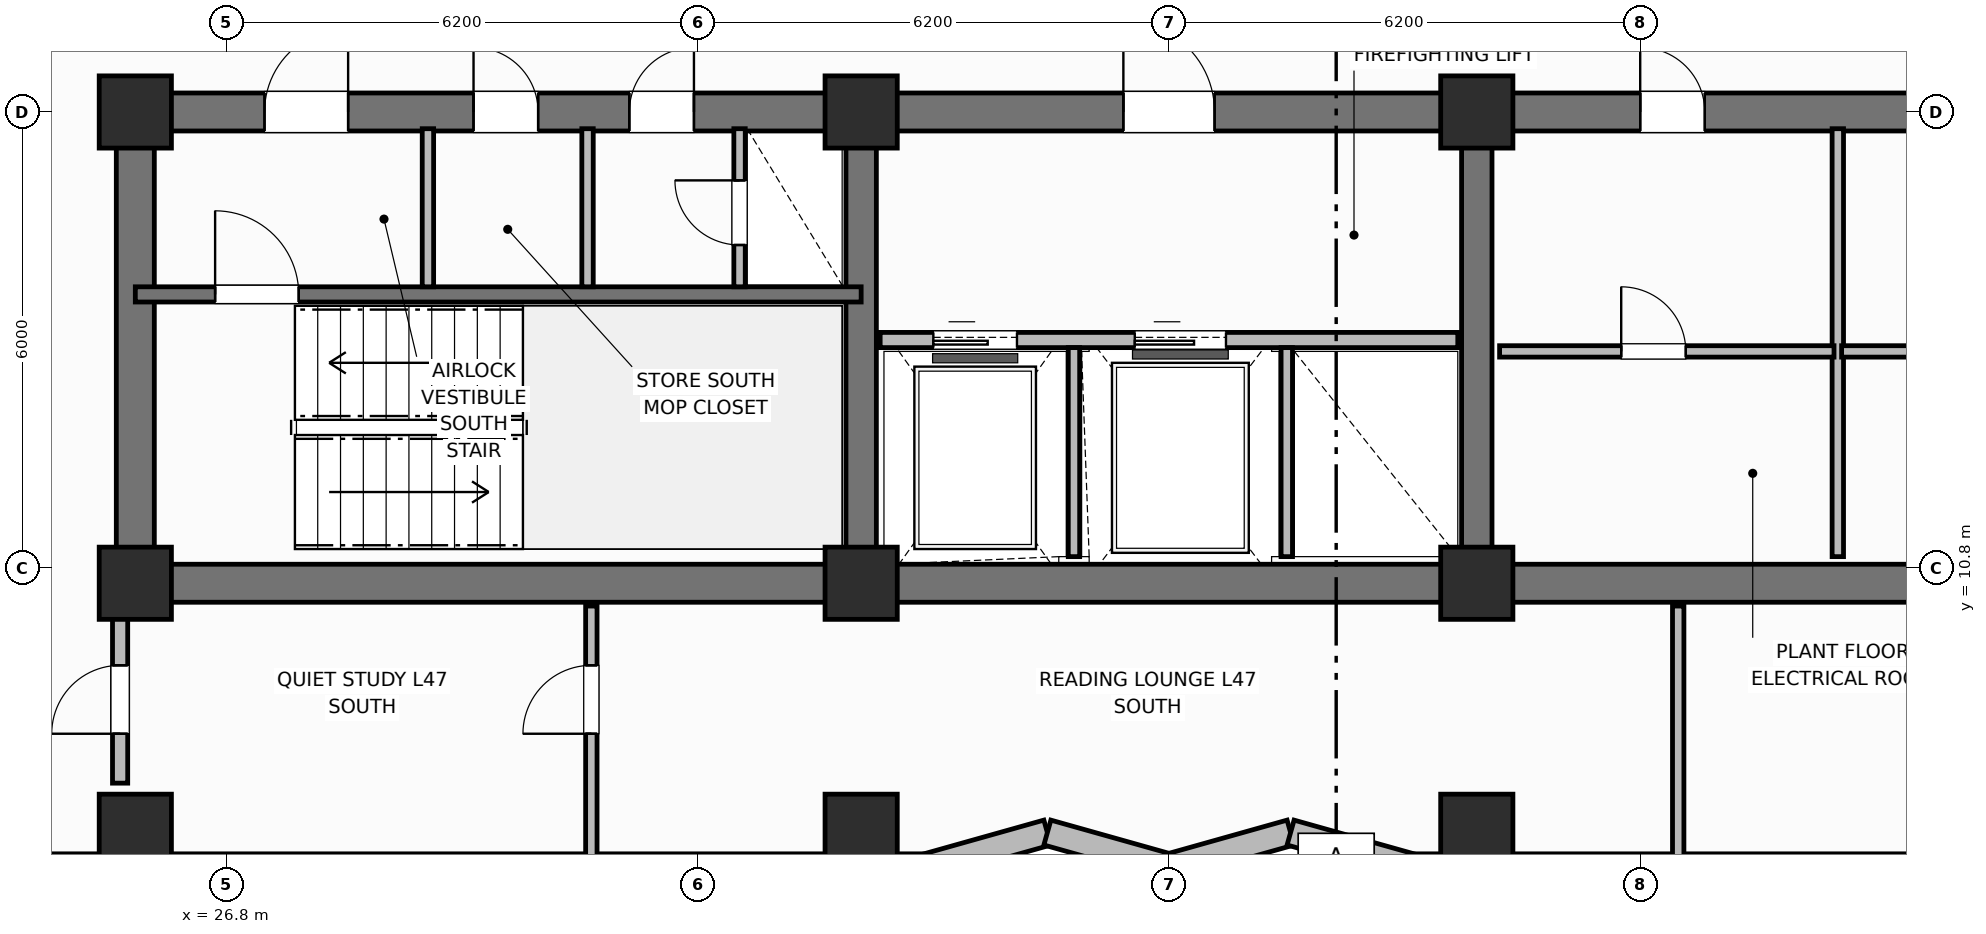
"""IFC4 building model, lengths in metres.
Left out: names, types, materials, properties, quantities, classifications, styles, units other than length and angle.
Written with IfcOpenShell. Run it as: python <this file> out.ifc"""

import sys

from ifc_helpers import new_model, si_unit, direction, frame, frame_2d, origin, origin_2d, place, context, subcontext, project, spatial, rectangle, extrude, element, fill, save


model = new_model("IFC4")
c1 = context("Model", 3, precision=1e-05, world=origin(), true_north=direction((0.0, 1.0)))
c2 = subcontext(c1, "Body", "Model", "MODEL_VIEW")
j1 = project(units=[si_unit("LENGTHUNIT", "METRE"), si_unit("PLANEANGLEUNIT", "RADIAN")], contexts=[c1])
p1 = place(None, origin())
s1 = spatial("IfcSite", under=j1, at=p1, CompositionType="ELEMENT")
p2 = place(p1, origin())
s2 = spatial("IfcBuilding", under=s1, at=p2, CompositionType="ELEMENT")
p3 = place(p2, frame((0.0, 0.0, 188.5)))
s3 = spatial("IfcBuildingStorey", under=s2, at=p3, CompositionType="ELEMENT", Elevation=188.5)
p4 = place(p3, frame((52.8, 10.6, 0.0), z_axis=(0.0, 0.0, 1.0), x_axis=(-1.0, 0.0, 0.0)))
e1 = element("IfcWall", 1, at=p4, inside=s3, PredefinedType="SHEAR", context=c2, shape_type="SweptSolid", body=[
    extrude(rectangle(XDim=27.2, YDim=0.5, at=frame_2d((13.6, 0.0))), origin(), (0.0, 0.0, 1.0), 3.7),
])
p5 = place(p3, frame((25.6, 10.85, 0.0), z_axis=(0.0, 0.0, 1.0), x_axis=(0.0, 1.0, 0.0)))
e2 = element("IfcWall", 2, at=p5, inside=s3, PredefinedType="SHEAR", context=c2, shape_type="SweptSolid", body=[
    extrude(rectangle(XDim=5.7, YDim=0.5, at=frame_2d((2.85, 0.0))), origin(), (0.0, 0.0, 1.0), 3.7),
])
p6 = place(p3, frame((25.6, 16.8, 0.0), z_axis=(0.0, 0.0, 1.0), x_axis=(1.0, 0.0, 0.0)))
e3 = element("IfcWall", 3, at=p6, inside=s3, PredefinedType="SHEAR", context=c2, shape_type="SweptSolid", body=[
    extrude(rectangle(XDim=27.2, YDim=0.5, at=frame_2d((13.6, 0.0))), origin(), (0.0, 0.0, 1.0), 3.7),
])
p7 = place(p6, frame((1.7, 0.0, 0.0)))
e4 = element("IfcOpeningElement", 4, at=p7, cuts=e3, PredefinedType="OPENING", context=c2, shape_type="SweptSolid", body=[
    extrude(rectangle(XDim=1.1, YDim=2.15, at=frame_2d((0.55, 1.075))), frame((0.0, 0.26, 0.0), z_axis=(0.0, -1.0, 0.0), x_axis=(1.0, 0.0, 0.0)), (0.0, 0.0, 1.0), 0.52),
])
p8 = place(p6, frame((4.45, 0.0, 0.0)))
e5 = element("IfcOpeningElement", 5, at=p8, cuts=e3, PredefinedType="OPENING", context=c2, shape_type="SweptSolid", body=[
    extrude(rectangle(XDim=0.85, YDim=2.1, at=frame_2d((0.425, 1.05))), frame((0.0, 0.26, 0.0), z_axis=(0.0, -1.0, 0.0), x_axis=(1.0, 0.0, 0.0)), (0.0, 0.0, 1.0), 0.52),
])
p9 = place(p6, frame((6.5, 0.0, 0.0)))
e6 = element("IfcOpeningElement", 6, at=p9, cuts=e3, PredefinedType="OPENING", context=c2, shape_type="SweptSolid", body=[
    extrude(rectangle(XDim=0.85, YDim=2.1, at=frame_2d((0.425, 1.05))), frame((0.0, 0.26, 0.0), z_axis=(0.0, -1.0, 0.0), x_axis=(1.0, 0.0, 0.0)), (0.0, 0.0, 1.0), 0.52),
])
p10 = place(p6, frame((13.0, 0.0, 0.0)))
e7 = element("IfcOpeningElement", 7, at=p10, cuts=e3, PredefinedType="OPENING", context=c2, shape_type="SweptSolid", body=[
    extrude(rectangle(XDim=1.2, YDim=2.15, at=frame_2d((0.6, 1.075))), frame((0.0, 0.26, 0.0), z_axis=(0.0, -1.0, 0.0), x_axis=(1.0, 0.0, 0.0)), (0.0, 0.0, 1.0), 0.52),
])
p11 = place(p6, frame((19.8, 0.0, 0.0)))
e8 = element("IfcOpeningElement", 8, at=p11, cuts=e3, PredefinedType="OPENING", context=c2, shape_type="SweptSolid", body=[
    extrude(rectangle(XDim=0.85, YDim=2.1, at=frame_2d((0.425, 1.05))), frame((0.0, 0.26, 0.0), z_axis=(0.0, -1.0, 0.0), x_axis=(1.0, 0.0, 0.0)), (0.0, 0.0, 1.0), 0.52),
])
p12 = place(p6, frame((24.2, 0.0, 0.0)))
e9 = element("IfcOpeningElement", 9, at=p12, cuts=e3, PredefinedType="OPENING", context=c2, shape_type="SweptSolid", body=[
    extrude(rectangle(XDim=0.85, YDim=2.1, at=frame_2d((0.425, 1.05))), frame((0.0, 0.26, 0.0), z_axis=(0.0, -1.0, 0.0), x_axis=(1.0, 0.0, 0.0)), (0.0, 0.0, 1.0), 0.52),
])
for number, where, z_axis, x_axis in (
    (10, (35.15, 10.85, 0.0), (0.0, 0.0, 1.0), (0.0, 1.0, 0.0)),
    (11, (43.25, 10.85, 0.0), (0.0, 0.0, 1.0), (0.0, 1.0, 0.0)),
):
    element("IfcWall", number, at=place(p3, frame(where, z_axis=z_axis, x_axis=x_axis)), inside=s3, PredefinedType="SHEAR", context=c2, shape_type="SweptSolid", body=[
        extrude(rectangle(XDim=5.7, YDim=0.4, at=frame_2d((2.85, 0.0))), origin(), (0.0, 0.0, 1.0), 3.7),
    ])
for number, where, z_axis, x_axis in (
    (12, (25.6, 10.6, 0.0), (0.0, 0.0, 1.0), (1.0, 0.0, 0.0)),
    (13, (25.6, 16.8, 0.0), (0.0, 0.0, 1.0), (1.0, 0.0, 0.0)),
    (14, (35.15, 10.6, 0.0), (0.0, 0.0, 1.0), (1.0, 0.0, 0.0)),
    (15, (35.15, 16.8, 0.0), (0.0, 0.0, 1.0), (1.0, 0.0, 0.0)),
    (16, (43.25, 10.6, 0.0), (0.0, 0.0, 1.0), (1.0, 0.0, 0.0)),
    (17, (43.25, 16.8, 0.0), (0.0, 0.0, 1.0), (1.0, 0.0, 0.0)),
    (18, (25.6, 7.35, 0.0), (0.0, 0.0, 1.0), (1.0, 0.0, 0.0)),
    (19, (35.15, 7.35, 0.0), (0.0, 0.0, 1.0), (1.0, 0.0, 0.0)),
    (20, (43.25, 7.35, 0.0), (0.0, 0.0, 1.0), (1.0, 0.0, 0.0)),
):
    element("IfcColumn", number, at=place(p3, frame(where, z_axis=z_axis, x_axis=x_axis)), inside=s3, PredefinedType="COLUMN", context=c2, shape_type="SweptSolid", body=[
        extrude(rectangle(XDim=0.95, YDim=0.95, at=origin_2d()), origin(), (0.0, 0.0, 1.0), 3.7),
    ])
p13 = place(p3, frame((20.2, 6.87, 0.0), z_axis=(0.0, 0.0, 1.0), x_axis=(1.0, 0.0, 0.0)))
e21 = element("IfcWall", 21, at=p13, inside=s3, PredefinedType="SOLIDWALL", context=c2, shape_type="SweptSolid", body=[
    extrude(rectangle(XDim=15.8, YDim=0.34, at=frame_2d((7.9, 0.0))), origin(), (0.0, 0.0, 1.0), 2.72),
])
p14 = place(p13, frame((1.762, 0.0, 0.75)))
e22 = element("IfcOpeningElement", 22, at=p14, cuts=e21, PredefinedType="OPENING", context=c2, shape_type="SweptSolid", body=[
    extrude(rectangle(XDim=1.4, YDim=1.85, at=frame_2d((0.7, 0.925))), frame((0.0, 0.18, 0.0), z_axis=(0.0, -1.0, 0.0), x_axis=(1.0, 0.0, 0.0)), (0.0, 0.0, 1.0), 0.36),
])
p15 = place(p13, frame((9.012, 0.0, 0.75)))
e23 = element("IfcOpeningElement", 23, at=p15, cuts=e21, PredefinedType="OPENING", context=c2, shape_type="SweptSolid", body=[
    extrude(rectangle(XDim=1.4, YDim=1.85, at=frame_2d((0.7, 0.925))), frame((0.0, 0.18, 0.0), z_axis=(0.0, -1.0, 0.0), x_axis=(1.0, 0.0, 0.0)), (0.0, 0.0, 1.0), 0.36),
])
p16 = place(p13, frame((12.288, 0.0, 0.75)))
e24 = element("IfcOpeningElement", 24, at=p16, cuts=e21, PredefinedType="OPENING", context=c2, shape_type="SweptSolid", body=[
    extrude(rectangle(XDim=1.4, YDim=1.85, at=frame_2d((0.7, 0.925))), frame((0.0, 0.18, 0.0), z_axis=(0.0, -1.0, 0.0), x_axis=(1.0, 0.0, 0.0)), (0.0, 0.0, 1.0), 0.36),
])
p17 = place(p3, frame((36.0, 6.87, 0.0), z_axis=(0.0, 0.0, 1.0), x_axis=(0.962662902433, 0.270703040766, 0.0)))
e25 = element("IfcWall", 25, at=p17, inside=s3, PredefinedType="SOLIDWALL", context=c2, shape_type="SweptSolid", body=[
    extrude(rectangle(XDim=1.662, YDim=0.34, at=frame_2d((0.831, 0.0))), origin(), (0.0, 0.0, 1.0), 2.72),
])
p18 = place(p3, frame((37.6, 7.32, 0.0), z_axis=(0.0, 0.0, 1.0), x_axis=(0.962652136636, -0.270741322725, 0.0)))
e26 = element("IfcWall", 26, at=p18, inside=s3, PredefinedType="SOLIDWALL", context=c2, shape_type="SweptSolid", body=[
    extrude(rectangle(XDim=1.662, YDim=0.34, at=frame_2d((0.831, 0.0))), origin(), (0.0, 0.0, 1.0), 2.72),
])
p19 = place(p3, frame((39.2, 6.87, 0.0), z_axis=(0.0, 0.0, 1.0), x_axis=(0.962662902433, 0.270703040766, 0.0)))
e27 = element("IfcWall", 27, at=p19, inside=s3, PredefinedType="SOLIDWALL", context=c2, shape_type="SweptSolid", body=[
    extrude(rectangle(XDim=1.662, YDim=0.34, at=frame_2d((0.831, 0.0))), origin(), (0.0, 0.0, 1.0), 2.72),
])
p20 = place(p3, frame((40.8, 7.32, 0.0), z_axis=(0.0, 0.0, 1.0), x_axis=(0.962652136636, -0.270741322725, 0.0)))
e28 = element("IfcWall", 28, at=p20, inside=s3, PredefinedType="SOLIDWALL", context=c2, shape_type="SweptSolid", body=[
    extrude(rectangle(XDim=1.662, YDim=0.34, at=frame_2d((0.831, 0.0))), origin(), (0.0, 0.0, 1.0), 2.72),
])
p21 = place(p3, frame((42.4, 6.87, 0.0), z_axis=(0.0, 0.0, 1.0), x_axis=(1.0, 0.0, 0.0)))
e29 = element("IfcWall", 29, at=p21, inside=s3, PredefinedType="SOLIDWALL", context=c2, shape_type="SweptSolid", body=[
    extrude(rectangle(XDim=15.8, YDim=0.34, at=frame_2d((7.9, 0.0))), origin(), (0.0, 0.0, 1.0), 2.72),
])
p22 = place(p21, frame((5.387, 0.0, 0.75)))
e30 = element("IfcOpeningElement", 30, at=p22, cuts=e29, PredefinedType="OPENING", context=c2, shape_type="SweptSolid", body=[
    extrude(rectangle(XDim=1.4, YDim=1.85, at=frame_2d((0.7, 0.925))), frame((0.0, 0.18, 0.0), z_axis=(0.0, -1.0, 0.0), x_axis=(1.0, 0.0, 0.0)), (0.0, 0.0, 1.0), 0.36),
])
p23 = place(p3, frame((25.6, 14.4, 0.0), z_axis=(0.0, 0.0, 1.0), x_axis=(1.0, 0.0, 0.0)))
e31 = element("IfcWall", 31, at=p23, inside=s3, PredefinedType="SHEAR", context=c2, shape_type="SweptSolid", body=[
    extrude(rectangle(XDim=9.55, YDim=0.2, at=frame_2d((4.775, 0.0))), origin(), (0.0, 0.0, 1.0), 3.7),
])
p24 = place(p23, frame((1.05, 0.0, 0.0)))
e32 = element("IfcOpeningElement", 32, at=p24, cuts=e31, PredefinedType="OPENING", context=c2, shape_type="SweptSolid", body=[
    extrude(rectangle(XDim=1.1, YDim=2.15, at=frame_2d((0.55, 1.075))), frame((0.0, 0.11, 0.0), z_axis=(0.0, -1.0, 0.0), x_axis=(1.0, 0.0, 0.0)), (0.0, 0.0, 1.0), 0.22),
])
for number, where, z_axis, x_axis in (
    (33, (29.45, 14.5, 0.0), (0.0, 0.0, 1.0), (0.0, 1.0, 0.0)),
    (34, (31.55, 14.5, 0.0), (0.0, 0.0, 1.0), (0.0, 1.0, 0.0)),
):
    element("IfcWall", number, at=place(p3, frame(where, z_axis=z_axis, x_axis=x_axis)), inside=s3, PredefinedType="PARTITIONING", context=c2, shape_type="SweptSolid", body=[
        extrude(rectangle(XDim=2.08, YDim=0.15, at=frame_2d((1.04, 0.0))), origin(), (0.0, 0.0, 1.0), 2.55),
    ])
p25 = place(p3, frame((33.55, 14.5, 0.0), z_axis=(0.0, 0.0, 1.0), x_axis=(0.0, 1.0, 0.0)))
e35 = element("IfcWall", 35, at=p25, inside=s3, PredefinedType="PARTITIONING", context=c2, shape_type="SweptSolid", body=[
    extrude(rectangle(XDim=2.08, YDim=0.15, at=frame_2d((1.04, 0.0))), origin(), (0.0, 0.0, 1.0), 2.55),
])
p26 = place(p25, frame((0.55, 0.0, 0.0)))
e36 = element("IfcOpeningElement", 36, at=p26, cuts=e35, PredefinedType="OPENING", context=c2, shape_type="SweptSolid", body=[
    extrude(rectangle(XDim=0.85, YDim=2.05, at=frame_2d((0.425, 1.025))), frame((0.0, 0.085, 0.0), z_axis=(0.0, -1.0, 0.0), x_axis=(1.0, 0.0, 0.0)), (0.0, 0.0, 1.0), 0.17),
])
p27 = place(p3, frame((35.4, 13.8, 0.0), z_axis=(0.0, 0.0, 1.0), x_axis=(1.0, 0.0, 0.0)))
e37 = element("IfcWall", 37, at=p27, inside=s3, PredefinedType="PARTITIONING", context=c2, shape_type="SweptSolid", body=[
    extrude(rectangle(XDim=7.6, YDim=0.2, at=frame_2d((3.8, 0.0))), origin(), (0.0, 0.0, 1.0), 2.32),
])
p28 = place(p27, frame((0.7, 0.0, 0.0)))
e38 = element("IfcOpeningElement", 38, at=p28, cuts=e37, PredefinedType="OPENING", context=c2, shape_type="SweptSolid", body=[
    extrude(rectangle(XDim=1.1, YDim=2.15, at=frame_2d((0.55, 1.075))), frame((0.0, 0.11, 0.0), z_axis=(0.0, -1.0, 0.0), x_axis=(1.0, 0.0, 0.0)), (0.0, 0.0, 1.0), 0.22),
])
p29 = place(p27, frame((3.35, 0.0, 0.0)))
e39 = element("IfcOpeningElement", 39, at=p29, cuts=e37, PredefinedType="OPENING", context=c2, shape_type="SweptSolid", body=[
    extrude(rectangle(XDim=1.2, YDim=2.15, at=frame_2d((0.6, 1.075))), frame((0.0, 0.11, 0.0), z_axis=(0.0, -1.0, 0.0), x_axis=(1.0, 0.0, 0.0)), (0.0, 0.0, 1.0), 0.22),
])
for number, where, z_axis, x_axis in (
    (40, (37.95, 10.95, 0.0), (0.0, 0.0, 1.0), (0.0, 1.0, 0.0)),
    (41, (40.75, 10.95, 0.0), (0.0, 0.0, 1.0), (0.0, 1.0, 0.0)),
):
    element("IfcWall", number, at=place(p3, frame(where, z_axis=z_axis, x_axis=x_axis)), inside=s3, PredefinedType="PARTITIONING", context=c2, shape_type="SweptSolid", body=[
        extrude(rectangle(XDim=2.75, YDim=0.15, at=frame_2d((1.375, 0.0))), origin(), (0.0, 0.0, 1.0), 2.55),
    ])
p30 = place(p3, frame((48.0, 10.95, 0.0), z_axis=(0.0, 0.0, 1.0), x_axis=(0.0, 1.0, 0.0)))
e42 = element("IfcWall", 42, at=p30, inside=s3, PredefinedType="PARTITIONING", context=c2, shape_type="SweptSolid", body=[
    extrude(rectangle(XDim=5.63, YDim=0.15, at=frame_2d((2.815, 0.0))), origin(), (0.0, 0.0, 1.0), 2.55),
])
p31 = place(p3, frame((43.55, 13.65, 0.0), z_axis=(0.0, 0.0, 1.0), x_axis=(1.0, 0.0, 0.0)))
e43 = element("IfcWall", 43, at=p31, inside=s3, PredefinedType="PARTITIONING", context=c2, shape_type="SweptSolid", body=[
    extrude(rectangle(XDim=4.4, YDim=0.15, at=frame_2d((2.2, 0.0))), origin(), (0.0, 0.0, 1.0), 2.55),
])
p32 = place(p31, frame((1.6, 0.0, 0.0)))
e44 = element("IfcOpeningElement", 44, at=p32, cuts=e43, PredefinedType="OPENING", context=c2, shape_type="SweptSolid", body=[
    extrude(rectangle(XDim=0.85, YDim=2.1, at=frame_2d((0.425, 1.05))), frame((0.0, 0.085, 0.0), z_axis=(0.0, -1.0, 0.0), x_axis=(1.0, 0.0, 0.0)), (0.0, 0.0, 1.0), 0.17),
])
p33 = place(p3, frame((48.05, 13.65, 0.0), z_axis=(0.0, 0.0, 1.0), x_axis=(1.0, 0.0, 0.0)))
e45 = element("IfcWall", 45, at=p33, inside=s3, PredefinedType="PARTITIONING", context=c2, shape_type="SweptSolid", body=[
    extrude(rectangle(XDim=4.4, YDim=0.15, at=frame_2d((2.2, 0.0))), origin(), (0.0, 0.0, 1.0), 2.55),
])
p34 = place(p33, frame((1.6, 0.0, 0.0)))
e46 = element("IfcOpeningElement", 46, at=p34, cuts=e45, PredefinedType="OPENING", context=c2, shape_type="SweptSolid", body=[
    extrude(rectangle(XDim=0.85, YDim=2.1, at=frame_2d((0.425, 1.05))), frame((0.0, 0.085, 0.0), z_axis=(0.0, -1.0, 0.0), x_axis=(1.0, 0.0, 0.0)), (0.0, 0.0, 1.0), 0.17),
])
p35 = place(p3, frame((31.6, 6.87, 0.0), z_axis=(0.0, 0.0, 1.0), x_axis=(0.0, 1.0, 0.0)))
e47 = element("IfcWall", 47, at=p35, inside=s3, PredefinedType="PARTITIONING", context=c2, shape_type="SweptSolid", body=[
    extrude(rectangle(XDim=3.43, YDim=0.15, at=frame_2d((1.715, 0.0))), origin(), (0.0, 0.0, 1.0), 2.55),
])
p36 = place(p35, frame((1.75, 0.0, 0.0)))
e48 = element("IfcOpeningElement", 48, at=p36, cuts=e47, PredefinedType="OPENING", context=c2, shape_type="SweptSolid", body=[
    extrude(rectangle(XDim=0.9, YDim=2.1, at=frame_2d((0.45, 1.05))), frame((0.0, 0.085, 0.0), z_axis=(0.0, -1.0, 0.0), x_axis=(1.0, 0.0, 0.0)), (0.0, 0.0, 1.0), 0.17),
])
p37 = place(p3, frame((45.9, 6.87, 0.0), z_axis=(0.0, 0.0, 1.0), x_axis=(0.0, 1.0, 0.0)))
e49 = element("IfcWall", 49, at=p37, inside=s3, PredefinedType="PARTITIONING", context=c2, shape_type="SweptSolid", body=[
    extrude(rectangle(XDim=3.43, YDim=0.15, at=frame_2d((1.715, 0.0))), origin(), (0.0, 0.0, 1.0), 2.55),
])
p38 = place(p3, frame((25.4, 7.97, 0.0), z_axis=(0.0, 0.0, 1.0), x_axis=(0.0, 1.0, 0.0)))
e50 = element("IfcWall", 50, at=p38, inside=s3, PredefinedType="PARTITIONING", context=c2, shape_type="SweptSolid", body=[
    extrude(rectangle(XDim=2.33, YDim=0.2, at=frame_2d((1.165, 0.0))), origin(), (0.0, 0.0, 1.0), 2.55),
])
p39 = place(p38, frame((0.65, 0.0, 0.0)))
e51 = element("IfcOpeningElement", 51, at=p39, cuts=e50, PredefinedType="OPENING", context=c2, shape_type="SweptSolid", body=[
    extrude(rectangle(XDim=0.9, YDim=2.1, at=frame_2d((0.45, 1.05))), frame((0.0, 0.11, 0.0), z_axis=(0.0, -1.0, 0.0), x_axis=(1.0, 0.0, 0.0)), (0.0, 0.0, 1.0), 0.22),
])
p40 = place(p24, origin())
e52 = element("IfcDoor", 52, at=p40, inside=s3, OperationType="SINGLE_SWING_LEFT", PredefinedType="DOOR", context=c2, shape_type="SweptSolid", body=[
    extrude(rectangle(XDim=1.1, YDim=2.15, at=frame_2d((0.55, 1.075))), frame((0.0, 0.025, 0.0), z_axis=(0.0, -1.0, 0.0), x_axis=(1.0, 0.0, 0.0)), (0.0, 0.0, 1.0), 0.05),
])
fill(e32, e52)
p41 = place(p26, origin())
e53 = element("IfcDoor", 53, at=p41, inside=s3, OperationType="SINGLE_SWING_RIGHT", PredefinedType="TRAPDOOR", context=c2, shape_type="SweptSolid", body=[
    extrude(rectangle(XDim=0.85, YDim=2.05, at=frame_2d((0.425, 1.025))), frame((0.0, 0.025, 0.0), z_axis=(0.0, -1.0, 0.0), x_axis=(1.0, 0.0, 0.0)), (0.0, 0.0, 1.0), 0.05),
])
fill(e36, e53)
p42 = place(p28, origin())
e54 = element("IfcDoor", 54, at=p42, inside=s3, OperationType="SLIDING_TO_LEFT", PredefinedType="DOOR", context=c2, shape_type="SweptSolid", body=[
    extrude(rectangle(XDim=1.1, YDim=2.15, at=frame_2d((0.55, 1.075))), frame((0.0, 0.025, 0.0), z_axis=(0.0, -1.0, 0.0), x_axis=(1.0, 0.0, 0.0)), (0.0, 0.0, 1.0), 0.05),
])
fill(e38, e54)
p43 = place(p29, origin())
e55 = element("IfcDoor", 55, at=p43, inside=s3, OperationType="SLIDING_TO_LEFT", PredefinedType="DOOR", context=c2, shape_type="SweptSolid", body=[
    extrude(rectangle(XDim=1.2, YDim=2.15, at=frame_2d((0.6, 1.075))), frame((0.0, 0.025, 0.0), z_axis=(0.0, -1.0, 0.0), x_axis=(1.0, 0.0, 0.0)), (0.0, 0.0, 1.0), 0.05),
])
fill(e39, e55)
p44 = place(p32, origin())
e56 = element("IfcDoor", 56, at=p44, inside=s3, OperationType="SINGLE_SWING_LEFT", PredefinedType="DOOR", context=c2, shape_type="SweptSolid", body=[
    extrude(rectangle(XDim=0.85, YDim=2.1, at=frame_2d((0.425, 1.05))), frame((0.0, 0.025, 0.0), z_axis=(0.0, -1.0, 0.0), x_axis=(1.0, 0.0, 0.0)), (0.0, 0.0, 1.0), 0.05),
])
fill(e44, e56)
p45 = place(p36, origin())
e57 = element("IfcDoor", 57, at=p45, inside=s3, OperationType="SINGLE_SWING_LEFT", PredefinedType="DOOR", context=c2, shape_type="SweptSolid", body=[
    extrude(rectangle(XDim=0.9, YDim=2.1, at=frame_2d((0.45, 1.05))), frame((0.0, 0.025, 0.0), z_axis=(0.0, -1.0, 0.0), x_axis=(1.0, 0.0, 0.0)), (0.0, 0.0, 1.0), 0.05),
])
fill(e48, e57)
p46 = place(p39, origin())
e58 = element("IfcDoor", 58, at=p46, inside=s3, OperationType="SINGLE_SWING_LEFT", PredefinedType="DOOR", context=c2, shape_type="SweptSolid", body=[
    extrude(rectangle(XDim=0.9, YDim=2.1, at=frame_2d((0.45, 1.05))), frame((0.0, 0.025, 0.0), z_axis=(0.0, -1.0, 0.0), x_axis=(1.0, 0.0, 0.0)), (0.0, 0.0, 1.0), 0.05),
])
fill(e51, e58)
p47 = place(p7, origin())
e59 = element("IfcDoor", 59, at=p47, inside=s3, OperationType="SINGLE_SWING_RIGHT", PredefinedType="DOOR", context=c2, shape_type="SweptSolid", body=[
    extrude(rectangle(XDim=1.1, YDim=2.15, at=frame_2d((0.55, 1.075))), frame((0.0, 0.025, 0.0), z_axis=(0.0, -1.0, 0.0), x_axis=(1.0, 0.0, 0.0)), (0.0, 0.0, 1.0), 0.05),
])
fill(e4, e59)
p48 = place(p8, origin())
e60 = element("IfcDoor", 60, at=p48, inside=s3, OperationType="SINGLE_SWING_LEFT", PredefinedType="DOOR", context=c2, shape_type="SweptSolid", body=[
    extrude(rectangle(XDim=0.85, YDim=2.1, at=frame_2d((0.425, 1.05))), frame((0.0, 0.025, 0.0), z_axis=(0.0, -1.0, 0.0), x_axis=(1.0, 0.0, 0.0)), (0.0, 0.0, 1.0), 0.05),
])
fill(e5, e60)
p49 = place(p9, origin())
e61 = element("IfcDoor", 61, at=p49, inside=s3, OperationType="SINGLE_SWING_RIGHT", PredefinedType="DOOR", context=c2, shape_type="SweptSolid", body=[
    extrude(rectangle(XDim=0.85, YDim=2.1, at=frame_2d((0.425, 1.05))), frame((0.0, 0.025, 0.0), z_axis=(0.0, -1.0, 0.0), x_axis=(1.0, 0.0, 0.0)), (0.0, 0.0, 1.0), 0.05),
])
fill(e6, e61)
p50 = place(p10, origin())
e62 = element("IfcDoor", 62, at=p50, inside=s3, OperationType="SINGLE_SWING_LEFT", PredefinedType="DOOR", context=c2, shape_type="SweptSolid", body=[
    extrude(rectangle(XDim=1.2, YDim=2.15, at=frame_2d((0.6, 1.075))), frame((0.0, 0.025, 0.0), z_axis=(0.0, -1.0, 0.0), x_axis=(1.0, 0.0, 0.0)), (0.0, 0.0, 1.0), 0.05),
])
fill(e7, e62)
p51 = place(p11, origin())
e63 = element("IfcDoor", 63, at=p51, inside=s3, OperationType="SINGLE_SWING_LEFT", PredefinedType="DOOR", context=c2, shape_type="SweptSolid", body=[
    extrude(rectangle(XDim=0.85, YDim=2.1, at=frame_2d((0.425, 1.05))), frame((0.0, 0.025, 0.0), z_axis=(0.0, -1.0, 0.0), x_axis=(1.0, 0.0, 0.0)), (0.0, 0.0, 1.0), 0.05),
])
fill(e8, e63)
save(model, sys.argv[1])
